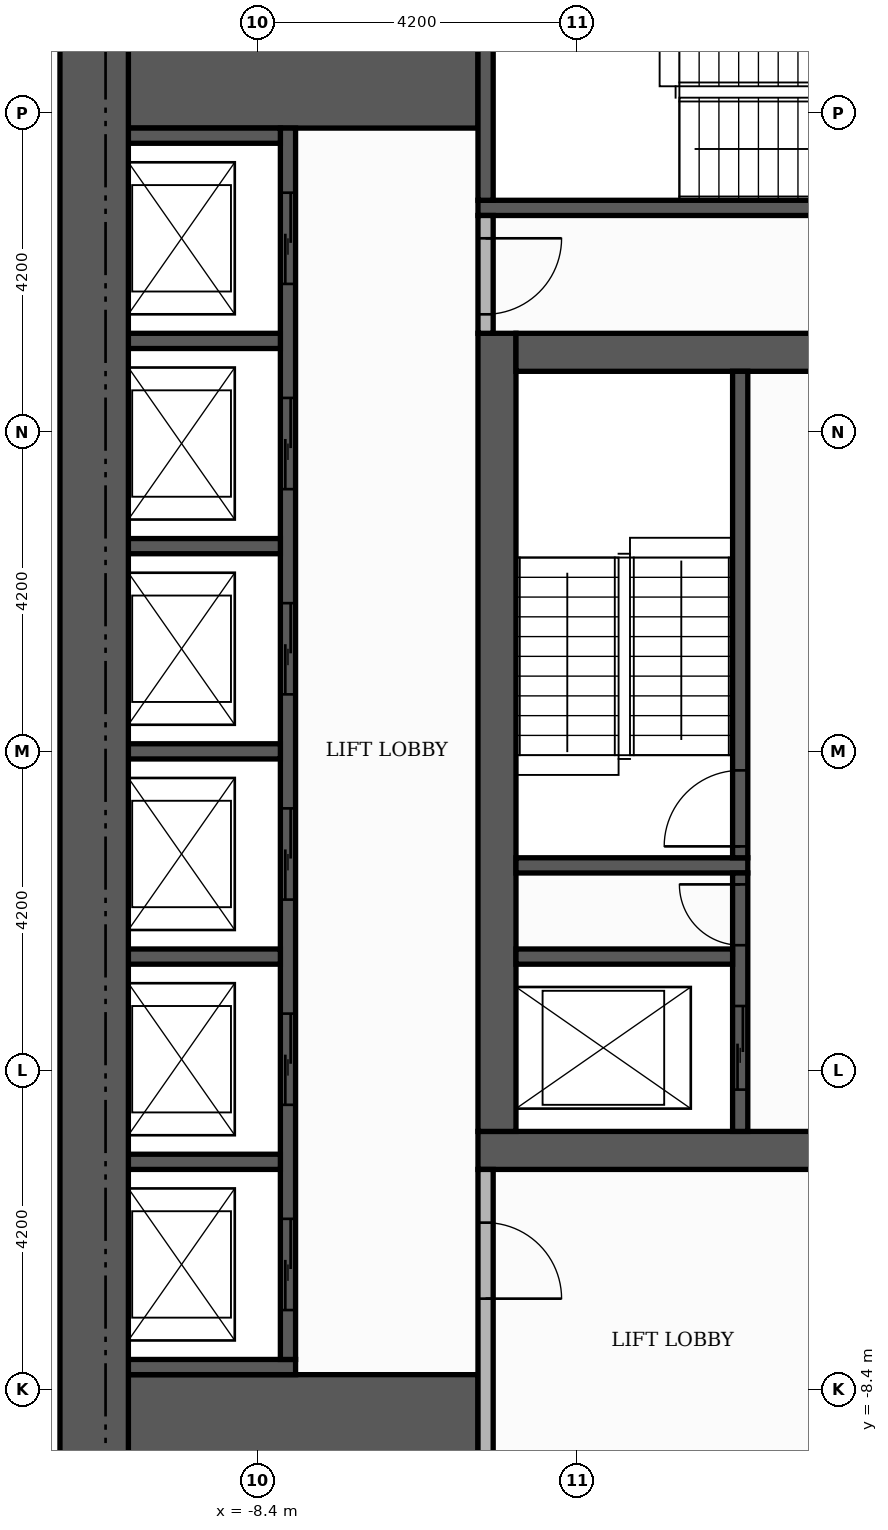
"""IFC4 building model, lengths in metres.
Left out: names, types, materials, properties, quantities, classifications, styles, units other than length and angle.
Written with IfcOpenShell. Run it as: python <this file> out.ifc"""

import sys

from ifc_helpers import new_model, si_unit, direction, frame, frame_2d, origin, place, context, subcontext, project, spatial, rectangle, extrude, element, fill, save


model = new_model("IFC4")
c1 = context("Model", 3, precision=1e-05, world=origin(), true_north=direction((0.0, 1.0)))
c2 = subcontext(c1, "Body", "Model", "MODEL_VIEW")
j1 = project(units=[si_unit("LENGTHUNIT", "METRE"), si_unit("PLANEANGLEUNIT", "RADIAN")], contexts=[c1])
p1 = place(None, origin())
s1 = spatial("IfcSite", under=j1, at=p1, CompositionType="ELEMENT")
p2 = place(p1, origin())
s2 = spatial("IfcBuilding", under=s1, at=p2, CompositionType="ELEMENT")
p3 = place(p2, frame((0.0, 0.0, 42.6)))
s3 = spatial("IfcBuildingStorey", under=s2, at=p3, CompositionType="ELEMENT", Elevation=42.6)
p4 = place(p3, frame((-5.5, -5.25, 0.0), z_axis=(0.0, 0.0, 1.0), x_axis=(1.0, 0.0, 0.0)))
e1 = element("IfcWall", 1, at=p4, inside=s3, PredefinedType="SHEAR", context=c2, shape_type="SweptSolid", body=[
    extrude(rectangle(XDim=11.0, YDim=0.5, at=frame_2d((5.5, 0.0))), origin(), (0.0, 0.0, 1.0), 3.48),
])
p5 = place(p4, frame((4.9, 0.0, 0.0)))
e2 = element("IfcOpeningElement", 2, at=p5, cuts=e1, PredefinedType="OPENING", context=c2, shape_type="SweptSolid", body=[
    extrude(rectangle(XDim=1.2, YDim=2.1, at=frame_2d((0.6, 1.05))), frame((0.0, 0.26, 0.0), z_axis=(0.0, -1.0, 0.0), x_axis=(1.0, 0.0, 0.0)), (0.0, 0.0, 1.0), 0.52),
])
p6 = place(p3, frame((-5.25, -5.0, 0.0), z_axis=(0.0, 0.0, 1.0), x_axis=(0.0, 1.0, 0.0)))
e3 = element("IfcWall", 3, at=p6, inside=s3, PredefinedType="SHEAR", context=c2, shape_type="SweptSolid", body=[
    extrude(rectangle(XDim=10.5, YDim=0.5, at=frame_2d((5.25, 0.0))), origin(), (0.0, 0.0, 1.0), 3.48),
])
p7 = place(p3, frame((-5.0, 5.25, 0.0), z_axis=(0.0, 0.0, 1.0), x_axis=(1.0, 0.0, 0.0)))
e4 = element("IfcWall", 4, at=p7, inside=s3, PredefinedType="SHEAR", context=c2, shape_type="SweptSolid", body=[
    extrude(rectangle(XDim=10.0, YDim=0.5, at=frame_2d((5.0, 0.0))), origin(), (0.0, 0.0, 1.0), 3.48),
])
p8 = place(p7, frame((4.4, 0.0, 0.0)))
e5 = element("IfcOpeningElement", 5, at=p8, cuts=e4, PredefinedType="OPENING", context=c2, shape_type="SweptSolid", body=[
    extrude(rectangle(XDim=1.2, YDim=2.1, at=frame_2d((0.6, 1.05))), frame((0.0, 0.26, 0.0), z_axis=(0.0, -1.0, 0.0), x_axis=(1.0, 0.0, 0.0)), (0.0, 0.0, 1.0), 0.52),
])
for number, where, z_axis, x_axis in (
    (6, (-10.1, -9.15, 0.0), (0.0, 0.0, 1.0), (1.0, 0.0, 0.0)),
    (7, (-10.1, 9.15, 0.0), (0.0, 0.0, 1.0), (1.0, 0.0, 0.0)),
):
    element("IfcWall", number, at=place(p3, frame(where, z_axis=z_axis, x_axis=x_axis)), inside=s3, PredefinedType="SHEAR", context=c2, shape_type="SweptSolid", body=[
        extrude(rectangle(XDim=4.6, YDim=1.9, at=frame_2d((2.3, 0.0))), origin(), (0.0, 0.0, 1.0), 3.48),
    ])
p9 = place(p3, frame((-5.0, -1.5, 0.0), z_axis=(0.0, 0.0, 1.0), x_axis=(1.0, 0.0, 0.0)))
e8 = element("IfcWall", 8, at=p9, inside=s3, PredefinedType="SHEAR", context=c2, shape_type="SweptSolid", body=[
    extrude(rectangle(XDim=3.05, YDim=0.2, at=frame_2d((1.525, 0.0))), origin(), (0.0, 0.0, 1.0), 3.48),
])
p10 = place(p3, frame((-2.05, -1.4, 0.0), z_axis=(0.0, 0.0, 1.0), x_axis=(0.0, 1.0, 0.0)))
e9 = element("IfcWall", 9, at=p10, inside=s3, PredefinedType="SHEAR", context=c2, shape_type="SweptSolid", body=[
    extrude(rectangle(XDim=6.4, YDim=0.2, at=frame_2d((3.2, 0.0))), origin(), (0.0, 0.0, 1.0), 3.48),
])
p11 = place(p10, frame((0.15, 0.0, 0.0)))
e10 = element("IfcOpeningElement", 10, at=p11, cuts=e9, PredefinedType="OPENING", context=c2, shape_type="SweptSolid", body=[
    extrude(rectangle(XDim=1.0, YDim=2.1, at=frame_2d((0.5, 1.05))), frame((0.0, 0.11, 0.0), z_axis=(0.0, -1.0, 0.0), x_axis=(1.0, 0.0, 0.0)), (0.0, 0.0, 1.0), 0.22),
])
p12 = place(p3, frame((-5.5, 7.15, 0.0), z_axis=(0.0, 0.0, 1.0), x_axis=(1.0, 0.0, 0.0)))
e11 = element("IfcWall", 11, at=p12, inside=s3, PredefinedType="SHEAR", context=c2, shape_type="SweptSolid", body=[
    extrude(rectangle(XDim=6.8, YDim=0.2, at=frame_2d((3.4, 0.0))), origin(), (0.0, 0.0, 1.0), 3.48),
])
p13 = place(p3, frame((-5.4, 7.25, 0.0), z_axis=(0.0, 0.0, 1.0), x_axis=(0.0, 1.0, 0.0)))
e12 = element("IfcWall", 12, at=p13, inside=s3, PredefinedType="SHEAR", context=c2, shape_type="SweptSolid", body=[
    extrude(rectangle(XDim=2.85, YDim=0.2, at=frame_2d((1.425, 0.0))), origin(), (0.0, 0.0, 1.0), 3.48),
])
p14 = place(p3, frame((-10.1, -8.1, 0.0), z_axis=(0.0, 0.0, 1.0), x_axis=(1.0, 0.0, 0.0)))
e13 = element("IfcWall", 13, at=p14, inside=s3, PredefinedType="SHEAR", context=c2, shape_type="SweptSolid", body=[
    extrude(rectangle(XDim=2.2, YDim=0.2, at=frame_2d((1.1, 0.0))), origin(), (0.0, 0.0, 1.0), 3.48),
])
p15 = place(p3, frame((-8.0, -8.0, 0.0), z_axis=(0.0, 0.0, 1.0), x_axis=(0.0, 1.0, 0.0)))
e14 = element("IfcWall", 14, at=p15, inside=s3, PredefinedType="SHEAR", context=c2, shape_type="SweptSolid", body=[
    extrude(rectangle(XDim=16.2, YDim=0.2, at=frame_2d((8.1, 0.0))), origin(), (0.0, 0.0, 1.0), 3.48),
])
p16 = place(p15, frame((0.65, 0.0, 0.0)))
e15 = element("IfcOpeningElement", 15, at=p16, cuts=e14, PredefinedType="OPENING", context=c2, shape_type="SweptSolid", body=[
    extrude(rectangle(XDim=1.2, YDim=2.1, at=frame_2d((0.6, 1.05))), frame((0.0, 0.11, 0.0), z_axis=(0.0, -1.0, 0.0), x_axis=(1.0, 0.0, 0.0)), (0.0, 0.0, 1.0), 0.22),
])
p17 = place(p15, frame((3.35, 0.0, 0.0)))
e16 = element("IfcOpeningElement", 16, at=p17, cuts=e14, PredefinedType="OPENING", context=c2, shape_type="SweptSolid", body=[
    extrude(rectangle(XDim=1.2, YDim=2.1, at=frame_2d((0.6, 1.05))), frame((0.0, 0.11, 0.0), z_axis=(0.0, -1.0, 0.0), x_axis=(1.0, 0.0, 0.0)), (0.0, 0.0, 1.0), 0.22),
])
p18 = place(p15, frame((6.05, 0.0, 0.0)))
e17 = element("IfcOpeningElement", 17, at=p18, cuts=e14, PredefinedType="OPENING", context=c2, shape_type="SweptSolid", body=[
    extrude(rectangle(XDim=1.2, YDim=2.1, at=frame_2d((0.6, 1.05))), frame((0.0, 0.11, 0.0), z_axis=(0.0, -1.0, 0.0), x_axis=(1.0, 0.0, 0.0)), (0.0, 0.0, 1.0), 0.22),
])
p19 = place(p15, frame((8.75, 0.0, 0.0)))
e18 = element("IfcOpeningElement", 18, at=p19, cuts=e14, PredefinedType="OPENING", context=c2, shape_type="SweptSolid", body=[
    extrude(rectangle(XDim=1.2, YDim=2.1, at=frame_2d((0.6, 1.05))), frame((0.0, 0.11, 0.0), z_axis=(0.0, -1.0, 0.0), x_axis=(1.0, 0.0, 0.0)), (0.0, 0.0, 1.0), 0.22),
])
p20 = place(p15, frame((11.45, 0.0, 0.0)))
e19 = element("IfcOpeningElement", 19, at=p20, cuts=e14, PredefinedType="OPENING", context=c2, shape_type="SweptSolid", body=[
    extrude(rectangle(XDim=1.2, YDim=2.1, at=frame_2d((0.6, 1.05))), frame((0.0, 0.11, 0.0), z_axis=(0.0, -1.0, 0.0), x_axis=(1.0, 0.0, 0.0)), (0.0, 0.0, 1.0), 0.22),
])
p21 = place(p15, frame((14.15, 0.0, 0.0)))
e20 = element("IfcOpeningElement", 20, at=p21, cuts=e14, PredefinedType="OPENING", context=c2, shape_type="SweptSolid", body=[
    extrude(rectangle(XDim=1.2, YDim=2.1, at=frame_2d((0.6, 1.05))), frame((0.0, 0.11, 0.0), z_axis=(0.0, -1.0, 0.0), x_axis=(1.0, 0.0, 0.0)), (0.0, 0.0, 1.0), 0.22),
])
p22 = place(p3, frame((-10.1, -5.4, 0.0), z_axis=(0.0, 0.0, 1.0), x_axis=(1.0, 0.0, 0.0)))
e21 = element("IfcWall", 21, at=p22, inside=s3, PredefinedType="SHEAR", context=c2, shape_type="SweptSolid", body=[
    extrude(rectangle(XDim=2.0, YDim=0.2, at=frame_2d((1.0, 0.0))), origin(), (0.0, 0.0, 1.0), 3.48),
])
p23 = place(p3, frame((-2.05, -5.0, 0.0), z_axis=(0.0, 0.0, 1.0), x_axis=(0.0, 1.0, 0.0)))
e22 = element("IfcWall", 22, at=p23, inside=s3, PredefinedType="SHEAR", context=c2, shape_type="SweptSolid", body=[
    extrude(rectangle(XDim=3.4, YDim=0.2, at=frame_2d((1.7, 0.0))), origin(), (0.0, 0.0, 1.0), 3.48),
])
p24 = place(p23, frame((0.55, 0.0, 0.0)))
e23 = element("IfcOpeningElement", 23, at=p24, cuts=e22, PredefinedType="OPENING", context=c2, shape_type="SweptSolid", body=[
    extrude(rectangle(XDim=1.1, YDim=2.1, at=frame_2d((0.55, 1.05))), frame((0.0, 0.11, 0.0), z_axis=(0.0, -1.0, 0.0), x_axis=(1.0, 0.0, 0.0)), (0.0, 0.0, 1.0), 0.22),
])
p25 = place(p23, frame((2.45, 0.0, 0.0)))
e24 = element("IfcOpeningElement", 24, at=p25, cuts=e22, PredefinedType="OPENING", context=c2, shape_type="SweptSolid", body=[
    extrude(rectangle(XDim=0.8, YDim=2.1, at=frame_2d((0.4, 1.05))), frame((0.0, 0.11, 0.0), z_axis=(0.0, -1.0, 0.0), x_axis=(1.0, 0.0, 0.0)), (0.0, 0.0, 1.0), 0.22),
])
p26 = place(p3, frame((-10.1, -2.7, 0.0), z_axis=(0.0, 0.0, 1.0), x_axis=(1.0, 0.0, 0.0)))
e25 = element("IfcWall", 25, at=p26, inside=s3, PredefinedType="SHEAR", context=c2, shape_type="SweptSolid", body=[
    extrude(rectangle(XDim=2.0, YDim=0.2, at=frame_2d((1.0, 0.0))), origin(), (0.0, 0.0, 1.0), 3.48),
])
p27 = place(p3, frame((-5.0, -2.7, 0.0), z_axis=(0.0, 0.0, 1.0), x_axis=(1.0, 0.0, 0.0)))
e26 = element("IfcWall", 26, at=p27, inside=s3, PredefinedType="SHEAR", context=c2, shape_type="SweptSolid", body=[
    extrude(rectangle(XDim=2.85, YDim=0.2, at=frame_2d((1.425, 0.0))), origin(), (0.0, 0.0, 1.0), 3.48),
])
for number, where, z_axis, x_axis in (
    (27, (-10.1, 0.0, 0.0), (0.0, 0.0, 1.0), (1.0, 0.0, 0.0)),
    (28, (-10.1, 2.7, 0.0), (0.0, 0.0, 1.0), (1.0, 0.0, 0.0)),
    (29, (-10.1, 5.4, 0.0), (0.0, 0.0, 1.0), (1.0, 0.0, 0.0)),
    (30, (-10.1, 8.1, 0.0), (0.0, 0.0, 1.0), (1.0, 0.0, 0.0)),
):
    element("IfcWall", number, at=place(p3, frame(where, z_axis=z_axis, x_axis=x_axis)), inside=s3, PredefinedType="SHEAR", context=c2, shape_type="SweptSolid", body=[
        extrude(rectangle(XDim=2.0, YDim=0.2, at=frame_2d((1.0, 0.0))), origin(), (0.0, 0.0, 1.0), 3.48),
    ])
p28 = place(p3, frame((-10.55, -10.1, 0.0), z_axis=(0.0, 0.0, 1.0), x_axis=(0.0, 1.0, 0.0)))
e31 = element("IfcWall", 31, at=p28, inside=s3, PredefinedType="SHEAR", context=c2, shape_type="SweptSolid", body=[
    extrude(rectangle(XDim=20.2, YDim=0.9, at=frame_2d((10.1, 0.0))), origin(), (0.0, 0.0, 1.0), 3.48),
])
p29 = place(p3, frame((-5.4, -10.1, 0.0), z_axis=(0.0, 0.0, 1.0), x_axis=(0.0, 1.0, 0.0)))
e32 = element("IfcWall", 32, at=p29, inside=s3, PredefinedType="PARTITIONING", context=c2, shape_type="SweptSolid", body=[
    extrude(rectangle(XDim=4.6, YDim=0.2, at=frame_2d((2.3, 0.0))), origin(), (0.0, 0.0, 1.0), 3.48),
])
p30 = place(p29, frame((2.9, 0.0, 0.0)))
e33 = element("IfcOpeningElement", 33, at=p30, cuts=e32, PredefinedType="OPENING", context=c2, shape_type="SweptSolid", body=[
    extrude(rectangle(XDim=1.0, YDim=2.1, at=frame_2d((0.5, 1.05))), frame((0.0, 0.11, 0.0), z_axis=(0.0, -1.0, 0.0), x_axis=(1.0, 0.0, 0.0)), (0.0, 0.0, 1.0), 0.22),
])
p31 = place(p3, frame((-5.4, 5.5, 0.0), z_axis=(0.0, 0.0, 1.0), x_axis=(0.0, 1.0, 0.0)))
e34 = element("IfcWall", 34, at=p31, inside=s3, PredefinedType="PARTITIONING", context=c2, shape_type="SweptSolid", body=[
    extrude(rectangle(XDim=1.55, YDim=0.2, at=frame_2d((0.775, 0.0))), origin(), (0.0, 0.0, 1.0), 3.48),
])
p32 = place(p31, frame((0.25, 0.0, 0.0)))
e35 = element("IfcOpeningElement", 35, at=p32, cuts=e34, PredefinedType="OPENING", context=c2, shape_type="SweptSolid", body=[
    extrude(rectangle(XDim=1.0, YDim=2.1, at=frame_2d((0.5, 1.05))), frame((0.0, 0.11, 0.0), z_axis=(0.0, -1.0, 0.0), x_axis=(1.0, 0.0, 0.0)), (0.0, 0.0, 1.0), 0.22),
])
p33 = place(p16, origin())
e36 = element("IfcDoor", 36, at=p33, inside=s3, OperationType="SLIDING_TO_LEFT", PredefinedType="DOOR", context=c2, shape_type="SweptSolid", body=[
    extrude(rectangle(XDim=1.2, YDim=2.1, at=frame_2d((0.6, 1.05))), frame((0.0, 0.025, 0.0), z_axis=(0.0, -1.0, 0.0), x_axis=(1.0, 0.0, 0.0)), (0.0, 0.0, 1.0), 0.05),
])
fill(e15, e36)
p34 = place(p17, origin())
e37 = element("IfcDoor", 37, at=p34, inside=s3, OperationType="SLIDING_TO_LEFT", PredefinedType="DOOR", context=c2, shape_type="SweptSolid", body=[
    extrude(rectangle(XDim=1.2, YDim=2.1, at=frame_2d((0.6, 1.05))), frame((0.0, 0.025, 0.0), z_axis=(0.0, -1.0, 0.0), x_axis=(1.0, 0.0, 0.0)), (0.0, 0.0, 1.0), 0.05),
])
fill(e16, e37)
p35 = place(p18, origin())
e38 = element("IfcDoor", 38, at=p35, inside=s3, OperationType="SLIDING_TO_LEFT", PredefinedType="DOOR", context=c2, shape_type="SweptSolid", body=[
    extrude(rectangle(XDim=1.2, YDim=2.1, at=frame_2d((0.6, 1.05))), frame((0.0, 0.025, 0.0), z_axis=(0.0, -1.0, 0.0), x_axis=(1.0, 0.0, 0.0)), (0.0, 0.0, 1.0), 0.05),
])
fill(e17, e38)
p36 = place(p19, origin())
e39 = element("IfcDoor", 39, at=p36, inside=s3, OperationType="SLIDING_TO_LEFT", PredefinedType="DOOR", context=c2, shape_type="SweptSolid", body=[
    extrude(rectangle(XDim=1.2, YDim=2.1, at=frame_2d((0.6, 1.05))), frame((0.0, 0.025, 0.0), z_axis=(0.0, -1.0, 0.0), x_axis=(1.0, 0.0, 0.0)), (0.0, 0.0, 1.0), 0.05),
])
fill(e18, e39)
p37 = place(p20, origin())
e40 = element("IfcDoor", 40, at=p37, inside=s3, OperationType="SLIDING_TO_LEFT", PredefinedType="DOOR", context=c2, shape_type="SweptSolid", body=[
    extrude(rectangle(XDim=1.2, YDim=2.1, at=frame_2d((0.6, 1.05))), frame((0.0, 0.025, 0.0), z_axis=(0.0, -1.0, 0.0), x_axis=(1.0, 0.0, 0.0)), (0.0, 0.0, 1.0), 0.05),
])
fill(e19, e40)
p38 = place(p21, origin())
e41 = element("IfcDoor", 41, at=p38, inside=s3, OperationType="SLIDING_TO_LEFT", PredefinedType="DOOR", context=c2, shape_type="SweptSolid", body=[
    extrude(rectangle(XDim=1.2, YDim=2.1, at=frame_2d((0.6, 1.05))), frame((0.0, 0.025, 0.0), z_axis=(0.0, -1.0, 0.0), x_axis=(1.0, 0.0, 0.0)), (0.0, 0.0, 1.0), 0.05),
])
fill(e20, e41)
p39 = place(p24, origin())
e42 = element("IfcDoor", 42, at=p39, inside=s3, OperationType="SLIDING_TO_LEFT", PredefinedType="DOOR", context=c2, shape_type="SweptSolid", body=[
    extrude(rectangle(XDim=1.1, YDim=2.1, at=frame_2d((0.55, 1.05))), frame((0.0, 0.025, 0.0), z_axis=(0.0, -1.0, 0.0), x_axis=(1.0, 0.0, 0.0)), (0.0, 0.0, 1.0), 0.05),
])
fill(e23, e42)
p40 = place(p11, origin())
e43 = element("IfcDoor", 43, at=p40, inside=s3, OperationType="SINGLE_SWING_LEFT", PredefinedType="DOOR", context=c2, shape_type="SweptSolid", body=[
    extrude(rectangle(XDim=1.0, YDim=2.1, at=frame_2d((0.5, 1.05))), frame((0.0, 0.025, 0.0), z_axis=(0.0, -1.0, 0.0), x_axis=(1.0, 0.0, 0.0)), (0.0, 0.0, 1.0), 0.05),
])
fill(e10, e43)
p41 = place(p25, origin())
e44 = element("IfcDoor", 44, at=p41, inside=s3, OperationType="SINGLE_SWING_RIGHT", PredefinedType="DOOR", context=c2, shape_type="SweptSolid", body=[
    extrude(rectangle(XDim=0.8, YDim=2.1, at=frame_2d((0.4, 1.05))), frame((0.0, 0.025, 0.0), z_axis=(0.0, -1.0, 0.0), x_axis=(1.0, 0.0, 0.0)), (0.0, 0.0, 1.0), 0.05),
])
fill(e24, e44)
p42 = place(p32, frame((1.0, 0.0, 0.0), z_axis=(0.0, 0.0, 1.0), x_axis=(-1.0, 0.0, 0.0)))
e45 = element("IfcDoor", 45, at=p42, inside=s3, OperationType="SINGLE_SWING_RIGHT", PredefinedType="DOOR", context=c2, shape_type="SweptSolid", body=[
    extrude(rectangle(XDim=1.0, YDim=2.1, at=frame_2d((0.5, 1.05))), frame((0.0, 0.025, 0.0), z_axis=(0.0, -1.0, 0.0), x_axis=(1.0, 0.0, 0.0)), (0.0, 0.0, 1.0), 0.05),
])
fill(e35, e45)
p43 = place(p30, frame((1.0, 0.0, 0.0), z_axis=(0.0, 0.0, 1.0), x_axis=(-1.0, 0.0, 0.0)))
e46 = element("IfcDoor", 46, at=p43, inside=s3, OperationType="SINGLE_SWING_LEFT", PredefinedType="DOOR", context=c2, shape_type="SweptSolid", body=[
    extrude(rectangle(XDim=1.0, YDim=2.1, at=frame_2d((0.5, 1.05))), frame((0.0, 0.025, 0.0), z_axis=(0.0, -1.0, 0.0), x_axis=(1.0, 0.0, 0.0)), (0.0, 0.0, 1.0), 0.05),
])
fill(e33, e46)
save(model, sys.argv[1])
